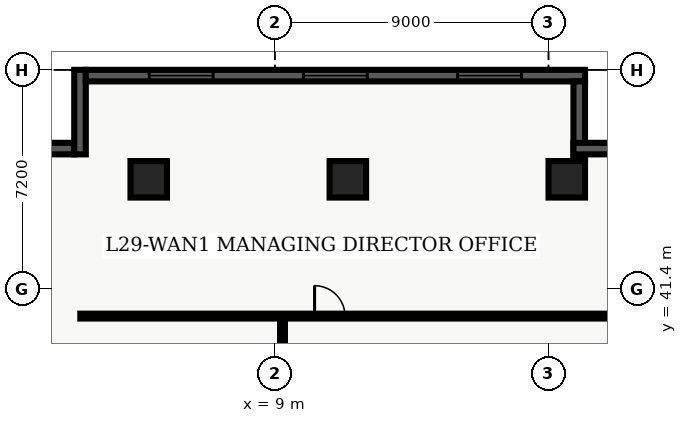
"""IFC4 building model, lengths in metres.
Left out: names, types, materials, properties, quantities, classifications, styles, units other than length and angle.
Written with IfcOpenShell. Run it as: python <this file> out.ifc"""

import sys

from ifc_helpers import new_model, entity, si_unit, converted_unit, direction, frame, origin_with_axes, origin_2d_with_axis, place, context, subcontext, project, spatial, polyline, rectangle, outline, extrude, element, fill, save


model = new_model("IFC4")
c1 = context("Model", 3, precision=1e-05, world=origin_with_axes(), true_north=direction((0.0, 1.0)))
c2 = subcontext(c1, "Body", "Model", "MODEL_VIEW")
j1 = project(units=[si_unit("LENGTHUNIT", "METRE"), converted_unit("PLANEANGLEUNIT", "DEGREE", entity("IfcPlaneAngleMeasure", 0.017), si_unit("PLANEANGLEUNIT", "RADIAN"), dimensions=[0, 0, 0, 0, 0, 0, 0])], contexts=[c1])
p1 = place(None, origin_with_axes())
s1 = spatial("IfcSite", under=j1, at=p1, CompositionType="ELEMENT")
p2 = place(p1, origin_with_axes())
s2 = spatial("IfcBuilding", under=s1, at=p2, CompositionType="ELEMENT")
p3 = place(p2, frame((0.0, 0.0, 120.3), z_axis=(0.0, 0.0, 1.0), x_axis=(1.0, 0.0, 0.0)))
s3 = spatial("IfcBuildingStorey", under=s2, at=p3, CompositionType="ELEMENT", Elevation=120.3)
for number, where, z_axis, x_axis in (
    (1, (11.4, 45.0, 0.0), (0.0, 0.0, 1.0), (1.0, 0.0, 0.0)),
    (2, (18.6, 45.0, 0.0), (0.0, 0.0, 1.0), (1.0, 0.0, 0.0)),
    (3, (4.85, 45.0, 0.0), (0.0, 0.0, 1.0), (1.0, 0.0, 0.0)),
):
    element("IfcColumn", number, at=place(p3, frame(where, z_axis=z_axis, x_axis=x_axis)), inside=s3, PredefinedType="COLUMN", context=c2, shape_type="SweptSolid", body=[
        extrude(rectangle(XDim=1.2, YDim=1.2, at=origin_2d_with_axis()), origin_with_axes(), (0.0, 0.0, 1.0), 3.9),
    ])
p4 = place(p3, frame((2.6, 40.5, 0.0), z_axis=(0.0, 0.0, 1.0), x_axis=(1.0, 0.0, 0.0)))
e4 = element("IfcWall", 4, at=p4, inside=s3, PredefinedType="PARTITIONING", context=c2, shape_type="SweptSolid", body=[
    extrude(outline(polyline([(0.0, -0.08), (18.65, -0.08), (18.65, 0.08), (0.0, 0.08), (0.0, -0.08)])), origin_with_axes(), (0.0, 0.0, 1.0), 2.64),
])
p5 = place(p4, frame((8.205, 0.0, 0.0), z_axis=(0.0, 0.0, 1.0), x_axis=(1.0, 0.0, 0.0)))
e5 = element("IfcOpeningElement", 5, at=p5, cuts=e4, PredefinedType="OPENING", context=c2, shape_type="SweptSolid", body=[
    extrude(rectangle(XDim=1.0, YDim=0.18, at=origin_2d_with_axis()), origin_with_axes(), (0.0, 0.0, 1.0), 2.15),
])
p6 = place(p3, frame((9.25, 24.4, 0.0), z_axis=(0.0, 0.0, 1.0), x_axis=(0.0, 1.0, 0.0)))
e6 = element("IfcWall", 6, at=p6, inside=s3, PredefinedType="PARTITIONING", context=c2, shape_type="SweptSolid", body=[
    extrude(outline(polyline([(0.0, -0.08), (16.1, -0.08), (16.1, 0.08), (0.0, 0.08), (0.0, -0.08)])), origin_with_axes(), (0.0, 0.0, 1.0), 2.64),
])
p7 = place(p6, frame((3.804, 0.0, 0.0), z_axis=(0.0, 0.0, 1.0), x_axis=(1.0, 0.0, 0.0)))
e7 = element("IfcOpeningElement", 7, at=p7, cuts=e6, PredefinedType="OPENING", context=c2, shape_type="SweptSolid", body=[
    extrude(rectangle(XDim=1.0, YDim=0.18, at=origin_2d_with_axis()), origin_with_axes(), (0.0, 0.0, 1.0), 2.15),
])
p8 = place(p6, frame((9.476, 0.0, 0.0), z_axis=(0.0, 0.0, 1.0), x_axis=(1.0, 0.0, 0.0)))
e8 = element("IfcOpeningElement", 8, at=p8, cuts=e6, PredefinedType="OPENING", context=c2, shape_type="SweptSolid", body=[
    extrude(rectangle(XDim=1.0, YDim=0.18, at=origin_2d_with_axis()), origin_with_axes(), (0.0, 0.0, 1.0), 2.15),
])
p9 = place(p6, frame((13.696, 0.0, 0.0), z_axis=(0.0, 0.0, 1.0), x_axis=(1.0, 0.0, 0.0)))
e9 = element("IfcOpeningElement", 9, at=p9, cuts=e6, PredefinedType="OPENING", context=c2, shape_type="SweptSolid", body=[
    extrude(rectangle(XDim=1.0, YDim=0.18, at=origin_2d_with_axis()), origin_with_axes(), (0.0, 0.0, 1.0), 2.15),
])
p10 = place(p3, frame((0.38, 46.01, 0.0), z_axis=(0.0, 0.0, 1.0), x_axis=(1.0, 0.0, 0.0)))
e10 = element("IfcWall", 10, at=p10, inside=s3, PredefinedType="SOLIDWALL", context=c2, shape_type="SweptSolid", body=[
    extrude(outline(polyline([(0.0, -0.19), (2.02, -0.19), (2.02, 0.19), (0.0, 0.19), (0.0, -0.19)])), origin_with_axes(), (0.0, 0.0, 1.0), 3.6),
])
p11 = place(p3, frame((2.59, 45.82, 0.0), z_axis=(0.0, 0.0, 1.0), x_axis=(0.0, 1.0, 0.0)))
e11 = element("IfcWall", 11, at=p11, inside=s3, PredefinedType="SOLIDWALL", context=c2, shape_type="SweptSolid", body=[
    extrude(outline(polyline([(0.0, -0.19), (2.78, -0.19), (2.78, 0.19), (0.0, 0.19), (0.0, -0.19)])), origin_with_axes(), (0.0, 0.0, 1.0), 3.6),
])
p12 = place(p3, frame((2.78, 48.41, 0.0), z_axis=(0.0, 0.0, 1.0), x_axis=(1.0, 0.0, 0.0)))
e12 = element("IfcWall", 12, at=p12, inside=s3, PredefinedType="SOLIDWALL", context=c2, shape_type="SweptSolid", body=[
    extrude(outline(polyline([(0.0, -0.19), (16.42, -0.19), (16.42, 0.19), (0.0, 0.19), (0.0, -0.19)])), origin_with_axes(), (0.0, 0.0, 1.0), 3.6),
])
p13 = place(p12, frame((3.137, 0.0, 0.45), z_axis=(0.0, 0.0, 1.0), x_axis=(1.0, 0.0, 0.0)))
e13 = element("IfcOpeningElement", 13, at=p13, cuts=e12, PredefinedType="OPENING", context=c2, shape_type="SweptSolid", body=[
    extrude(rectangle(XDim=2.1, YDim=0.4, at=origin_2d_with_axis()), origin_with_axes(), (0.0, 0.0, 1.0), 2.2),
])
p14 = place(p12, frame((8.21, 0.0, 0.45), z_axis=(0.0, 0.0, 1.0), x_axis=(1.0, 0.0, 0.0)))
e14 = element("IfcOpeningElement", 14, at=p14, cuts=e12, PredefinedType="OPENING", context=c2, shape_type="SweptSolid", body=[
    extrude(rectangle(XDim=2.1, YDim=0.4, at=origin_2d_with_axis()), origin_with_axes(), (0.0, 0.0, 1.0), 2.2),
])
p15 = place(p12, frame((13.283, 0.0, 0.45), z_axis=(0.0, 0.0, 1.0), x_axis=(1.0, 0.0, 0.0)))
e15 = element("IfcOpeningElement", 15, at=p15, cuts=e12, PredefinedType="OPENING", context=c2, shape_type="SweptSolid", body=[
    extrude(rectangle(XDim=2.1, YDim=0.4, at=origin_2d_with_axis()), origin_with_axes(), (0.0, 0.0, 1.0), 2.2),
])
p16 = place(p3, frame((19.01, 48.22, 0.0), z_axis=(0.0, 0.0, 1.0), x_axis=(0.0, -1.0, 0.0)))
e16 = element("IfcWall", 16, at=p16, inside=s3, PredefinedType="SOLIDWALL", context=c2, shape_type="SweptSolid", body=[
    extrude(outline(polyline([(0.0, -0.19), (2.56, -0.19), (2.56, 0.19), (0.0, 0.19), (0.0, -0.19)])), origin_with_axes(), (0.0, 0.0, 1.0), 3.6),
])
p17 = place(p3, frame((18.82, 46.01, 0.0), z_axis=(0.0, 0.0, 1.0), x_axis=(1.0, 0.0, 0.0)))
e17 = element("IfcWall", 17, at=p17, inside=s3, PredefinedType="SOLIDWALL", context=c2, shape_type="SweptSolid", body=[
    extrude(outline(polyline([(0.0, -0.19), (2.78, -0.19), (2.78, 0.19), (0.0, 0.19), (0.0, -0.19)])), origin_with_axes(), (0.0, 0.0, 1.0), 3.6),
])
p18 = place(p4, frame((8.205, 0.0, 0.0), z_axis=(0.0, 0.0, 1.0), x_axis=(1.0, 0.0, 0.0)))
e18 = element("IfcDoor", 18, at=p18, inside=s3, OperationType="SINGLE_SWING_LEFT", PredefinedType="DOOR", context=c2, shape_type="SweptSolid", body=[
    extrude(rectangle(XDim=1.0, YDim=0.09, at=origin_2d_with_axis()), origin_with_axes(), (0.0, 0.0, 1.0), 2.15),
])
fill(e5, e18)
p19 = place(p12, frame((3.137, 0.0, 0.45), z_axis=(0.0, 0.0, 1.0), x_axis=(1.0, 0.0, 0.0)))
e19 = element("IfcWindow", 19, at=p19, inside=s3, PredefinedType="WINDOW", context=c2, shape_type="SweptSolid", body=[
    extrude(rectangle(XDim=2.1, YDim=0.09, at=origin_2d_with_axis()), origin_with_axes(), (0.0, 0.0, 1.0), 2.2),
])
fill(e13, e19)
p20 = place(p12, frame((8.21, 0.0, 0.45), z_axis=(0.0, 0.0, 1.0), x_axis=(1.0, 0.0, 0.0)))
e20 = element("IfcWindow", 20, at=p20, inside=s3, PredefinedType="WINDOW", context=c2, shape_type="SweptSolid", body=[
    extrude(rectangle(XDim=2.1, YDim=0.09, at=origin_2d_with_axis()), origin_with_axes(), (0.0, 0.0, 1.0), 2.2),
])
fill(e14, e20)
p21 = place(p12, frame((13.283, 0.0, 0.45), z_axis=(0.0, 0.0, 1.0), x_axis=(1.0, 0.0, 0.0)))
e21 = element("IfcWindow", 21, at=p21, inside=s3, PredefinedType="WINDOW", context=c2, shape_type="SweptSolid", body=[
    extrude(rectangle(XDim=2.1, YDim=0.09, at=origin_2d_with_axis()), origin_with_axes(), (0.0, 0.0, 1.0), 2.2),
])
fill(e15, e21)
save(model, sys.argv[1])
